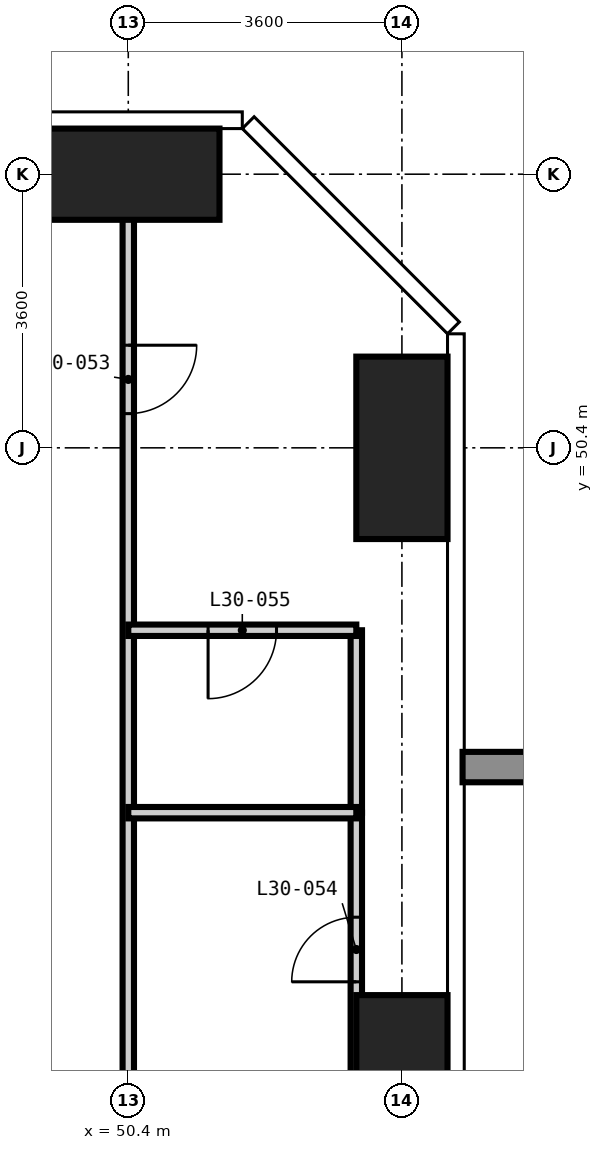
"""IFC4 building model, lengths in metres.
Left out: names, types, materials, properties, quantities, classifications, styles, units other than length and angle.
Written with IfcOpenShell. Run it as: python <this file> out.ifc"""

import sys

from ifc_helpers import new_model, si_unit, direction, frame, frame_2d, origin, origin_2d, place, context, subcontext, project, spatial, rectangle, extrude, element, fill, save


model = new_model("IFC4")
c1 = context("Model", 3, precision=1e-05, world=origin(), true_north=direction((0.0, 1.0)))
c2 = subcontext(c1, "Body", "Model", "MODEL_VIEW")
j1 = project(units=[si_unit("LENGTHUNIT", "METRE"), si_unit("PLANEANGLEUNIT", "RADIAN")], contexts=[c1])
p1 = place(None, origin())
s1 = spatial("IfcSite", under=j1, at=p1, CompositionType="ELEMENT")
p2 = place(p1, origin())
s2 = spatial("IfcBuilding", under=s1, at=p2, CompositionType="ELEMENT")
p3 = place(p2, frame((0.0, 0.0, 118.8)))
s3 = spatial("IfcBuildingStorey", under=s2, at=p3, CompositionType="ELEMENT", Elevation=118.8)
p4 = place(p3, frame((50.4, 54.0, -0.35), z_axis=(0.0, 0.0, 1.0), x_axis=(1.0, 0.0, 0.0)))
e1 = element("IfcColumn", 1, at=p4, inside=s3, PredefinedType="COLUMN", context=c2, shape_type="SweptSolid", body=[
    extrude(rectangle(XDim=2.4, YDim=1.2, at=origin_2d()), origin(), (0.0, 0.0, 1.0), 3.6),
])
for number, where, z_axis, x_axis in (
    (2, (54.0, 42.0, -0.35), (0.0, 0.0, 1.0), (1.0, 0.0, 0.0)),
    (3, (54.0, 50.4, -0.35), (0.0, 0.0, 1.0), (1.0, 0.0, 0.0)),
):
    element("IfcColumn", number, at=place(p3, frame(where, z_axis=z_axis, x_axis=x_axis)), inside=s3, PredefinedType="COLUMN", context=c2, shape_type="SweptSolid", body=[
        extrude(rectangle(XDim=1.2, YDim=2.4, at=origin_2d()), origin(), (0.0, 0.0, 1.0), 3.6),
    ])
p5 = place(p3, frame((53.4, 42.0, 0.0), z_axis=(0.0, 0.0, 1.0), x_axis=(0.0, 1.0, 0.0)))
e4 = element("IfcWall", 4, at=p5, inside=s3, PredefinedType="PARTITIONING", context=c2, shape_type="SweptSolid", body=[
    extrude(rectangle(XDim=3.6, YDim=0.15, at=frame_2d((1.8, 0.0))), origin(), (0.0, 0.0, 1.0), 3.25),
])
p6 = place(p5, frame((1.375, 0.0, 0.0)))
e5 = element("IfcOpeningElement", 5, at=p6, cuts=e4, PredefinedType="OPENING", context=c2, shape_type="SweptSolid", body=[
    extrude(rectangle(XDim=0.85, YDim=2.1, at=frame_2d((0.425, 1.05))), frame((0.0, 0.085, 0.0), z_axis=(0.0, -1.0, 0.0), x_axis=(1.0, 0.0, 0.0)), (0.0, 0.0, 1.0), 0.17),
])
p7 = place(p3, frame((50.4, 42.0, 0.0), z_axis=(0.0, 0.0, 1.0), x_axis=(0.0, 1.0, 0.0)))
e6 = element("IfcWall", 6, at=p7, inside=s3, PredefinedType="PARTITIONING", context=c2, shape_type="SweptSolid", body=[
    extrude(rectangle(XDim=12.618, YDim=0.15, at=frame_2d((6.309, 0.0))), origin(), (0.0, 0.0, 1.0), 3.25),
])
p8 = place(p7, frame((8.85, 0.0, 0.0)))
e7 = element("IfcOpeningElement", 7, at=p8, cuts=e6, PredefinedType="OPENING", context=c2, shape_type="SweptSolid", body=[
    extrude(rectangle(XDim=0.9, YDim=2.1, at=frame_2d((0.45, 1.05))), frame((0.0, 0.085, 0.0), z_axis=(0.0, -1.0, 0.0), x_axis=(1.0, 0.0, 0.0)), (0.0, 0.0, 1.0), 0.17),
])
p9 = place(p3, frame((53.4, 45.6, 0.0), z_axis=(0.0, 0.0, 1.0), x_axis=(0.0, 1.0, 0.0)))
e8 = element("IfcWall", 8, at=p9, inside=s3, PredefinedType="PARTITIONING", context=c2, shape_type="SweptSolid", body=[
    extrude(rectangle(XDim=2.4, YDim=0.15, at=frame_2d((1.2, 0.0))), origin(), (0.0, 0.0, 1.0), 3.25),
])
p10 = place(p3, frame((50.4, 45.6, 0.0), z_axis=(0.0, 0.0, 1.0), x_axis=(1.0, 0.0, 0.0)))
e9 = element("IfcWall", 9, at=p10, inside=s3, PredefinedType="PARTITIONING", context=c2, shape_type="SweptSolid", body=[
    extrude(rectangle(XDim=3.0, YDim=0.15, at=frame_2d((1.5, 0.0))), origin(), (0.0, 0.0, 1.0), 3.25),
])
p11 = place(p3, frame((50.4, 48.0, 0.0), z_axis=(0.0, 0.0, 1.0), x_axis=(1.0, 0.0, 0.0)))
e10 = element("IfcWall", 10, at=p11, inside=s3, PredefinedType="PARTITIONING", context=c2, shape_type="SweptSolid", body=[
    extrude(rectangle(XDim=3.0, YDim=0.15, at=frame_2d((1.5, 0.0))), origin(), (0.0, 0.0, 1.0), 3.25),
])
p12 = place(p11, frame((1.05, 0.0, 0.0)))
e11 = element("IfcOpeningElement", 11, at=p12, cuts=e10, PredefinedType="OPENING", context=c2, shape_type="SweptSolid", body=[
    extrude(rectangle(XDim=0.9, YDim=2.1, at=frame_2d((0.45, 1.05))), frame((0.0, 0.085, 0.0), z_axis=(0.0, -1.0, 0.0), x_axis=(1.0, 0.0, 0.0)), (0.0, 0.0, 1.0), 0.17),
])
p13 = place(p8, frame((0.9, 0.0, 0.0), z_axis=(0.0, 0.0, 1.0), x_axis=(-1.0, 0.0, 0.0)))
e12 = element("IfcDoor", 12, at=p13, inside=s3, OperationType="SINGLE_SWING_LEFT", PredefinedType="DOOR", context=c2, shape_type="SweptSolid", body=[
    extrude(rectangle(XDim=0.9, YDim=2.1, at=frame_2d((0.45, 1.05))), frame((0.0, 0.025, 0.0), z_axis=(0.0, -1.0, 0.0), x_axis=(1.0, 0.0, 0.0)), (0.0, 0.0, 1.0), 0.05),
])
fill(e7, e12)
p14 = place(p6, origin())
e13 = element("IfcDoor", 13, at=p14, inside=s3, OperationType="SINGLE_SWING_LEFT", PredefinedType="DOOR", context=c2, shape_type="SweptSolid", body=[
    extrude(rectangle(XDim=0.85, YDim=2.1, at=frame_2d((0.425, 1.05))), frame((0.0, 0.025, 0.0), z_axis=(0.0, -1.0, 0.0), x_axis=(1.0, 0.0, 0.0)), (0.0, 0.0, 1.0), 0.05),
])
fill(e5, e13)
p15 = place(p12, frame((0.9, 0.0, 0.0), z_axis=(0.0, 0.0, 1.0), x_axis=(-1.0, 0.0, 0.0)))
e14 = element("IfcDoor", 14, at=p15, inside=s3, OperationType="SINGLE_SWING_RIGHT", PredefinedType="DOOR", context=c2, shape_type="SweptSolid", body=[
    extrude(rectangle(XDim=0.9, YDim=2.1, at=frame_2d((0.45, 1.05))), frame((0.0, 0.025, 0.0), z_axis=(0.0, -1.0, 0.0), x_axis=(1.0, 0.0, 0.0)), (0.0, 0.0, 1.0), 0.05),
])
fill(e11, e14)
save(model, sys.argv[1])
